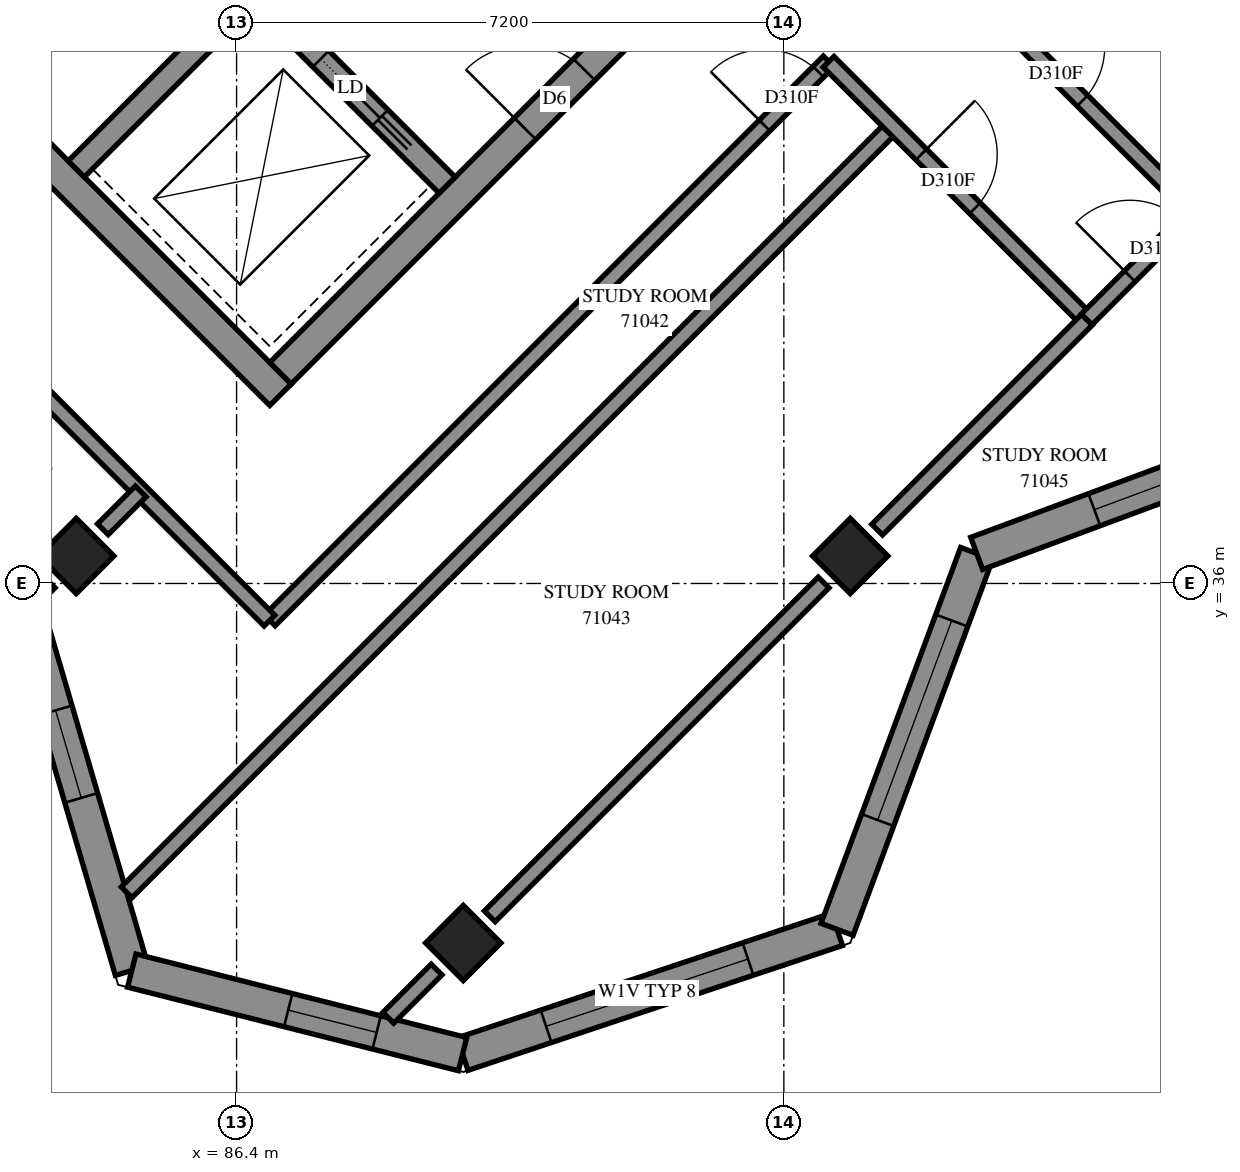
"""IFC4 building model, lengths in metres.
Left out: names, types, materials, properties, quantities, classifications, styles, units other than length and angle.
Written with IfcOpenShell. Run it as: python <this file> out.ifc"""

import sys

from ifc_helpers import new_model, si_unit, direction, frame, frame_2d, origin, origin_2d, place, context, subcontext, project, spatial, polyline, rectangle, outline, extrude, element, fill, save


model = new_model("IFC4")
c1 = context("Model", 3, precision=1e-05, world=origin(), true_north=direction((0.0, 1.0)))
c2 = subcontext(c1, "Body", "Model", "MODEL_VIEW")
j1 = project(units=[si_unit("LENGTHUNIT", "METRE"), si_unit("PLANEANGLEUNIT", "RADIAN")], contexts=[c1])
p1 = place(None, origin())
s1 = spatial("IfcSite", under=j1, at=p1, CompositionType="ELEMENT")
p2 = place(p1, origin())
s2 = spatial("IfcBuilding", under=s1, at=p2, CompositionType="ELEMENT")
p3 = place(p2, frame((0.0, 0.0, 260.8)))
s3 = spatial("IfcBuildingStorey", under=s2, at=p3, CompositionType="ELEMENT", Elevation=260.8)
for number, where, z_axis, x_axis in (
    (1, (84.291, 36.362, 0.0), (0.0, 0.0, 1.0), (0.707, -0.707, 0.0)),
    (2, (94.474, 36.362, 0.0), (0.0, 0.0, 1.0), (0.707, -0.707, 0.0)),
    (3, (89.382, 31.271, 0.0), (0.0, 0.0, 1.0), (0.707, -0.707, 0.0)),
):
    element("IfcColumn", number, at=place(p3, frame(where, z_axis=z_axis, x_axis=x_axis)), inside=s3, PredefinedType="COLUMN", context=c2, shape_type="SweptSolid", body=[
        extrude(rectangle(XDim=0.7, YDim=0.7, at=origin_2d()), origin(), (0.0, 0.0, 1.0), 3.1),
    ])
p4 = place(p3, frame((76.23, 49.231, -0.3), z_axis=(0.0, 0.0, 1.0), x_axis=(0.7071034917, -0.7071100706, 0.0)))
e4 = element("IfcWall", 4, at=p4, inside=s3, PredefinedType="SHEAR", context=c2, shape_type="SweptSolid", body=[
    extrude(rectangle(XDim=15.2, YDim=0.4, at=frame_2d((7.6, 0.0))), origin(), (0.0, 0.0, 1.0), 2.7),
])
p5 = place(p3, frame((86.978, 38.766, -0.3), z_axis=(0.0, 0.0, 1.0), x_axis=(0.7071067812, 0.7071067812, 0.0)))
e5 = element("IfcWall", 5, at=p5, inside=s3, PredefinedType="SHEAR", context=c2, shape_type="SweptSolid", body=[
    extrude(rectangle(XDim=14.4, YDim=0.4, at=frame_2d((7.2, 0.0))), origin(), (0.0, 0.0, 1.0), 2.7),
])
p6 = place(p5, frame((4.55, 0.0, 0.3)))
e6 = element("IfcOpeningElement", 6, at=p6, cuts=e5, PredefinedType="OPENING", context=c2, shape_type="SweptSolid", body=[
    extrude(rectangle(XDim=1.1, YDim=2.1, at=frame_2d((0.55, 1.05))), frame((0.0, 0.21, 0.0), z_axis=(0.0, -1.0, 0.0), x_axis=(1.0, 0.0, 0.0)), (0.0, 0.0, 1.0), 0.42),
])
p7 = place(p5, frame((11.35, 0.0, 0.3)))
e7 = element("IfcOpeningElement", 7, at=p7, cuts=e5, PredefinedType="OPENING", context=c2, shape_type="SweptSolid", body=[
    extrude(rectangle(XDim=1.1, YDim=2.1, at=frame_2d((0.55, 1.05))), frame((0.0, 0.21, 0.0), z_axis=(0.0, -1.0, 0.0), x_axis=(1.0, 0.0, 0.0)), (0.0, 0.0, 1.0), 0.42),
])
p8 = place(p3, frame((84.291, 41.453, 0.0), z_axis=(0.0, 0.0, 1.0), x_axis=(0.7071067812, 0.7071067812, 0.0)))
e8 = element("IfcWall", 8, at=p8, inside=s3, PredefinedType="SOLIDWALL", context=c2, shape_type="SweptSolid", body=[
    extrude(rectangle(XDim=3.3, YDim=0.3, at=frame_2d((1.65, 0.0))), origin(), (0.0, 0.0, 1.0), 3.1),
])
p9 = place(p3, frame((78.988, 51.423, 0.0), z_axis=(0.0, 0.0, 1.0), x_axis=(0.7071067812, -0.7071067812, 0.0)))
e9 = element("IfcWall", 9, at=p9, inside=s3, PredefinedType="SOLIDWALL", context=c2, shape_type="SweptSolid", body=[
    extrude(rectangle(XDim=14.4, YDim=0.3, at=frame_2d((7.2, 0.0))), origin(), (0.0, 0.0, 1.0), 3.1),
])
p10 = place(p9, frame((1.35, 0.0, 0.0)))
e10 = element("IfcOpeningElement", 10, at=p10, cuts=e9, PredefinedType="OPENING", context=c2, shape_type="SweptSolid", body=[
    extrude(rectangle(XDim=0.9, YDim=2.1, at=frame_2d((0.45, 1.05))), frame((0.0, 0.16, 0.0), z_axis=(0.0, -1.0, 0.0), x_axis=(1.0, 0.0, 0.0)), (0.0, 0.0, 1.0), 0.32),
])
p11 = place(p9, frame((4.95, 0.0, 0.0)))
e11 = element("IfcOpeningElement", 11, at=p11, cuts=e9, PredefinedType="OPENING", context=c2, shape_type="SweptSolid", body=[
    extrude(rectangle(XDim=0.9, YDim=2.1, at=frame_2d((0.45, 1.05))), frame((0.0, 0.16, 0.0), z_axis=(0.0, -1.0, 0.0), x_axis=(1.0, 0.0, 0.0)), (0.0, 0.0, 1.0), 0.32),
])
p12 = place(p9, frame((8.55, 0.0, 0.0)))
e12 = element("IfcOpeningElement", 12, at=p12, cuts=e9, PredefinedType="OPENING", context=c2, shape_type="SweptSolid", body=[
    extrude(rectangle(XDim=0.9, YDim=2.1, at=frame_2d((0.45, 1.05))), frame((0.0, 0.16, 0.0), z_axis=(0.0, -1.0, 0.0), x_axis=(1.0, 0.0, 0.0)), (0.0, 0.0, 1.0), 0.32),
])
p13 = place(p9, frame((12.05, 0.0, 0.0)))
e13 = element("IfcOpeningElement", 13, at=p13, cuts=e9, PredefinedType="OPENING", context=c2, shape_type="SweptSolid", body=[
    extrude(rectangle(XDim=1.1, YDim=2.1, at=frame_2d((0.55, 1.05))), frame((0.0, 0.16, 0.0), z_axis=(0.0, -1.0, 0.0), x_axis=(1.0, 0.0, 0.0)), (0.0, 0.0, 1.0), 0.32),
])
p14 = place(p3, frame((89.374, 29.808, 0.0), z_axis=(0.0, 0.0, 1.0), x_axis=(0.9486871493, 0.3162162119, 0.0)))
e14 = element("IfcWall", 14, at=p14, inside=s3, PredefinedType="SOLIDWALL", context=c2, shape_type="SweptSolid", body=[
    extrude(outline(polyline([(-0.066, -0.225), (5.301, -0.225), (5.085, 0.225), (0.066, 0.225), (-0.066, -0.225)])), origin(), (0.0, 0.0, 1.0), 3.1),
])
p15 = place(p14, frame((1.158, 0.0, 0.45)))
e15 = element("IfcOpeningElement", 15, at=p15, cuts=e14, PredefinedType="OPENING", context=c2, shape_type="SweptSolid", body=[
    extrude(rectangle(XDim=2.8, YDim=2.55, at=frame_2d((1.4, 1.275))), frame((0.0, 0.235, 0.0), z_axis=(0.0, -1.0, 0.0), x_axis=(1.0, 0.0, 0.0)), (0.0, 0.0, 1.0), 0.47),
])
p16 = place(p3, frame((94.3, 31.45, 0.0), z_axis=(0.0, 0.0, 1.0), x_axis=(0.3481927166, 0.9374229739, 0.0)))
e16 = element("IfcWall", 16, at=p16, inside=s3, PredefinedType="SOLIDWALL", context=c2, shape_type="SweptSolid", body=[
    extrude(outline(polyline([(-0.108, -0.225), (5.172, -0.225), (5.379, 0.225), (0.108, 0.225), (-0.108, -0.225)])), origin(), (0.0, 0.0, 1.0), 3.1),
])
p17 = place(p16, frame((1.534, 0.0, 0.45)))
e17 = element("IfcOpeningElement", 17, at=p17, cuts=e16, PredefinedType="OPENING", context=c2, shape_type="SweptSolid", body=[
    extrude(rectangle(XDim=2.8, YDim=2.55, at=frame_2d((1.4, 1.275))), frame((0.0, 0.235, 0.0), z_axis=(0.0, -1.0, 0.0), x_axis=(1.0, 0.0, 0.0)), (0.0, 0.0, 1.0), 0.47),
])
p18 = place(p3, frame((96.137, 36.395, 0.0), z_axis=(0.0, 0.0, 1.0), x_axis=(0.937429161, 0.3481760591, 0.0)))
e18 = element("IfcWall", 18, at=p18, inside=s3, PredefinedType="SOLIDWALL", context=c2, shape_type="SweptSolid", body=[
    extrude(outline(polyline([(0.103, -0.225), (5.383, -0.225), (5.168, 0.225), (-0.103, 0.225), (0.103, -0.225)])), origin(), (0.0, 0.0, 1.0), 3.1),
])
p19 = place(p18, frame((1.651, 0.0, 0.45)))
e19 = element("IfcOpeningElement", 19, at=p19, cuts=e18, PredefinedType="OPENING", context=c2, shape_type="SweptSolid", body=[
    extrude(rectangle(XDim=2.8, YDim=2.55, at=frame_2d((1.4, 1.275))), frame((0.0, 0.235, 0.0), z_axis=(0.0, -1.0, 0.0), x_axis=(1.0, 0.0, 0.0)), (0.0, 0.0, 1.0), 0.47),
])
p20 = place(p3, frame((83.734, 35.301, 0.0), z_axis=(0.0, 0.0, 1.0), x_axis=(0.281023871, -0.9597007783, 0.0)))
e20 = element("IfcWall", 20, at=p20, inside=s3, PredefinedType="SOLIDWALL", context=c2, shape_type="SweptSolid", body=[
    extrude(outline(polyline([(0.123, -0.225), (4.707, -0.225), (4.45, 0.225), (-0.123, 0.225), (0.123, -0.225)])), origin(), (0.0, 0.0, 1.0), 3.1),
])
p21 = place(p20, frame((1.012, 0.0, 0.45)))
e21 = element("IfcOpeningElement", 21, at=p21, cuts=e20, PredefinedType="OPENING", context=c2, shape_type="SweptSolid", body=[
    extrude(rectangle(XDim=1.2, YDim=2.55, at=frame_2d((0.6, 1.275))), frame((0.0, 0.235, 0.0), z_axis=(0.0, -1.0, 0.0), x_axis=(1.0, 0.0, 0.0)), (0.0, 0.0, 1.0), 0.47),
])
p22 = place(p3, frame((85.021, 30.907, 0.0), z_axis=(0.0, 0.0, 1.0), x_axis=(0.9695579017, -0.2448621555, 0.0)))
e22 = element("IfcWall", 22, at=p22, inside=s3, PredefinedType="SOLIDWALL", context=c2, shape_type="SweptSolid", body=[
    extrude(outline(polyline([(-0.129, -0.225), (4.555, -0.225), (4.423, 0.225), (0.129, 0.225), (-0.129, -0.225)])), origin(), (0.0, 0.0, 1.0), 3.1),
])
p23 = place(p22, frame((2.123, 0.0, 0.45)))
e23 = element("IfcOpeningElement", 23, at=p23, cuts=e22, PredefinedType="OPENING", context=c2, shape_type="SweptSolid", body=[
    extrude(rectangle(XDim=1.2, YDim=2.55, at=frame_2d((0.6, 1.275))), frame((0.0, 0.235, 0.0), z_axis=(0.0, -1.0, 0.0), x_axis=(1.0, 0.0, 0.0)), (0.0, 0.0, 1.0), 0.47),
])
p24 = place(p3, frame((84.954, 31.938, 0.0), z_axis=(0.0, 0.0, 1.0), x_axis=(0.7071769042, 0.7070366512, 0.0)))
e24 = element("IfcWall", 24, at=p24, inside=s3, PredefinedType="PARTITIONING", context=c2, shape_type="SweptSolid", body=[
    extrude(rectangle(XDim=14.26, YDim=0.2, at=frame_2d((7.13, 0.0))), origin(), (0.0, 0.0, 1.0), 3.1),
])
p25 = place(p3, frame((86.836, 35.514, 0.0), z_axis=(0.0, 0.0, 1.0), x_axis=(0.7071067812, 0.7071067812, 0.0)))
e25 = element("IfcWall", 25, at=p25, inside=s3, PredefinedType="PARTITIONING", context=c2, shape_type="SweptSolid", body=[
    extrude(rectangle(XDim=10.4, YDim=0.2, at=frame_2d((5.2, 0.0))), origin(), (0.0, 0.0, 1.0), 3.1),
])
p26 = place(p25, frame((9.207, 0.0, 0.0)))
e26 = element("IfcOpeningElement", 26, at=p26, cuts=e25, PredefinedType="OPENING", context=c2, shape_type="SweptSolid", body=[
    extrude(rectangle(XDim=1.0, YDim=2.1, at=frame_2d((0.5, 1.05))), frame((0.0, 0.11, 0.0), z_axis=(0.0, -1.0, 0.0), x_axis=(1.0, 0.0, 0.0)), (0.0, 0.0, 1.0), 0.22),
])
p27 = place(p3, frame((80.747, 41.597, 0.0), z_axis=(0.0, 0.0, 1.0), x_axis=(0.7071067812, -0.7071067812, 0.0)))
e27 = element("IfcWall", 27, at=p27, inside=s3, PredefinedType="PARTITIONING", context=c2, shape_type="SweptSolid", body=[
    extrude(rectangle(XDim=8.607, YDim=0.2, at=frame_2d((4.303, 0.0))), origin(), (0.0, 0.0, 1.0), 3.1),
])
p28 = place(p27, frame((0.195, 0.0, 0.0)))
e28 = element("IfcOpeningElement", 28, at=p28, cuts=e27, PredefinedType="OPENING", context=c2, shape_type="SweptSolid", body=[
    extrude(rectangle(XDim=1.0, YDim=2.1, at=frame_2d((0.5, 1.05))), frame((0.0, 0.11, 0.0), z_axis=(0.0, -1.0, 0.0), x_axis=(1.0, 0.0, 0.0)), (0.0, 0.0, 1.0), 0.22),
])
p29 = place(p27, frame((3.133, 0.0, 0.0)))
e29 = element("IfcOpeningElement", 29, at=p29, cuts=e27, PredefinedType="OPENING", context=c2, shape_type="SweptSolid", body=[
    extrude(rectangle(XDim=1.0, YDim=2.1, at=frame_2d((0.5, 1.05))), frame((0.0, 0.11, 0.0), z_axis=(0.0, -1.0, 0.0), x_axis=(1.0, 0.0, 0.0)), (0.0, 0.0, 1.0), 0.22),
])
p30 = place(p3, frame((89.731, 31.621, 0.0), z_axis=(0.0, 0.0, 1.0), x_axis=(0.7071067812, 0.7071067812, 0.0)))
e30 = element("IfcWall", 30, at=p30, inside=s3, PredefinedType="PARTITIONING", context=c2, shape_type="SweptSolid", body=[
    extrude(rectangle(XDim=6.211, YDim=0.2, at=frame_2d((3.106, 0.0))), origin(), (0.0, 0.0, 1.0), 2.6),
])
p31 = place(p3, frame((95.603, 44.277, 0.0), z_axis=(0.0, 0.0, 1.0), x_axis=(0.7071067812, -0.7071067812, 0.0)))
e31 = element("IfcWall", 31, at=p31, inside=s3, PredefinedType="PARTITIONING", context=c2, shape_type="SweptSolid", body=[
    extrude(rectangle(XDim=4.797, YDim=0.2, at=frame_2d((2.398, 0.0))), origin(), (0.0, 0.0, 1.0), 3.1),
])
p32 = place(p31, frame((1.723, 0.0, 0.0)))
e32 = element("IfcOpeningElement", 32, at=p32, cuts=e31, PredefinedType="OPENING", context=c2, shape_type="SweptSolid", body=[
    extrude(rectangle(XDim=1.0, YDim=2.1, at=frame_2d((0.5, 1.05))), frame((0.0, 0.11, 0.0), z_axis=(0.0, -1.0, 0.0), x_axis=(1.0, 0.0, 0.0)), (0.0, 0.0, 1.0), 0.22),
])
p33 = place(p3, frame((94.189, 42.863, 0.0), z_axis=(0.0, 0.0, 1.0), x_axis=(0.7071067812, -0.7071067812, 0.0)))
e33 = element("IfcWall", 33, at=p33, inside=s3, PredefinedType="PARTITIONING", context=c2, shape_type="SweptSolid", body=[
    extrude(rectangle(XDim=4.797, YDim=0.2, at=frame_2d((2.398, 0.0))), origin(), (0.0, 0.0, 1.0), 3.1),
])
p34 = place(p33, frame((1.723, 0.0, 0.0)))
e34 = element("IfcOpeningElement", 34, at=p34, cuts=e33, PredefinedType="OPENING", context=c2, shape_type="SweptSolid", body=[
    extrude(rectangle(XDim=1.0, YDim=2.1, at=frame_2d((0.5, 1.05))), frame((0.0, 0.11, 0.0), z_axis=(0.0, -1.0, 0.0), x_axis=(1.0, 0.0, 0.0)), (0.0, 0.0, 1.0), 0.22),
])
p35 = place(p3, frame((94.828, 36.709, 0.0), z_axis=(0.0, 0.0, 1.0), x_axis=(0.7068506295, 0.7073628401, 0.0)))
e35 = element("IfcWall", 35, at=p35, inside=s3, PredefinedType="PARTITIONING", context=c2, shape_type="SweptSolid", body=[
    extrude(rectangle(XDim=3.905, YDim=0.2, at=frame_2d((1.952, 0.0))), origin(), (0.0, 0.0, 1.0), 2.6),
])
p36 = place(p3, frame((97.584, 39.474, 0.0), z_axis=(0.0, 0.0, 1.0), x_axis=(0.7071067812, 0.7071067812, 0.0)))
e36 = element("IfcWall", 36, at=p36, inside=s3, PredefinedType="PARTITIONING", context=c2, shape_type="SweptSolid", body=[
    extrude(rectangle(XDim=2.0, YDim=0.2, at=frame_2d((1.0, 0.0))), origin(), (0.0, 0.0, 1.0), 2.6),
])
p37 = place(p36, frame((0.803, 0.0, 0.0)))
e37 = element("IfcOpeningElement", 37, at=p37, cuts=e36, PredefinedType="OPENING", context=c2, shape_type="SweptSolid", body=[
    extrude(rectangle(XDim=1.0, YDim=2.1, at=frame_2d((0.5, 1.05))), frame((0.0, 0.11, 0.0), z_axis=(0.0, -1.0, 0.0), x_axis=(1.0, 0.0, 0.0)), (0.0, 0.0, 1.0), 0.22),
])
p38 = place(p3, frame((88.397, 30.287, 0.0), z_axis=(0.0, 0.0, 1.0), x_axis=(0.7070510442, 0.7071625137, 0.0)))
e38 = element("IfcWall", 38, at=p38, inside=s3, PredefinedType="PARTITIONING", context=c2, shape_type="SweptSolid", body=[
    extrude(rectangle(XDim=0.897, YDim=0.2, at=frame_2d((0.449, 0.0))), origin(), (0.0, 0.0, 1.0), 3.1),
])
p39 = place(p3, frame((84.641, 36.713, 0.0), z_axis=(0.0, 0.0, 1.0), x_axis=(0.7071067812, 0.7071067812, 0.0)))
e39 = element("IfcWall", 39, at=p39, inside=s3, PredefinedType="PARTITIONING", context=c2, shape_type="SweptSolid", body=[
    extrude(rectangle(XDim=0.704, YDim=0.2, at=frame_2d((0.352, 0.0))), origin(), (0.0, 0.0, 1.0), 3.1),
])
p40 = place(p3, frame((83.525, 35.597, 0.0), z_axis=(0.0, 0.0, 1.0), x_axis=(0.7070217975, 0.7071917547, 0.0)))
e40 = element("IfcWall", 40, at=p40, inside=s3, PredefinedType="PARTITIONING", context=c2, shape_type="SweptSolid", body=[
    extrude(rectangle(XDim=0.588, YDim=0.2, at=frame_2d((0.294, 0.0))), origin(), (0.0, 0.0, 1.0), 3.1),
])
p41 = place(p15, origin())
e41 = element("IfcWindow", 41, at=p41, inside=s3, PartitioningType="SINGLE_PANEL", PredefinedType="WINDOW", context=c2, shape_type="SweptSolid", body=[
    extrude(rectangle(XDim=2.8, YDim=2.55, at=frame_2d((1.4, 1.275))), frame((0.0, 0.205, 0.0), z_axis=(0.0, -1.0, 0.0), x_axis=(1.0, 0.0, 0.0)), (0.0, 0.0, 1.0), 0.06),
])
fill(e15, e41)
p42 = place(p17, origin())
e42 = element("IfcWindow", 42, at=p42, inside=s3, PartitioningType="SINGLE_PANEL", PredefinedType="WINDOW", context=c2, shape_type="SweptSolid", body=[
    extrude(rectangle(XDim=2.8, YDim=2.55, at=frame_2d((1.4, 1.275))), frame((0.0, 0.205, 0.0), z_axis=(0.0, -1.0, 0.0), x_axis=(1.0, 0.0, 0.0)), (0.0, 0.0, 1.0), 0.06),
])
fill(e17, e42)
p43 = place(p19, origin())
e43 = element("IfcWindow", 43, at=p43, inside=s3, PartitioningType="SINGLE_PANEL", PredefinedType="WINDOW", context=c2, shape_type="SweptSolid", body=[
    extrude(rectangle(XDim=2.8, YDim=2.55, at=frame_2d((1.4, 1.275))), frame((0.0, 0.205, 0.0), z_axis=(0.0, -1.0, 0.0), x_axis=(1.0, 0.0, 0.0)), (0.0, 0.0, 1.0), 0.06),
])
fill(e19, e43)
p44 = place(p21, origin())
e44 = element("IfcWindow", 44, at=p44, inside=s3, PartitioningType="SINGLE_PANEL", PredefinedType="WINDOW", context=c2, shape_type="SweptSolid", body=[
    extrude(rectangle(XDim=1.2, YDim=2.55, at=frame_2d((0.6, 1.275))), frame((0.0, 0.205, 0.0), z_axis=(0.0, -1.0, 0.0), x_axis=(1.0, 0.0, 0.0)), (0.0, 0.0, 1.0), 0.06),
])
fill(e21, e44)
p45 = place(p23, origin())
e45 = element("IfcWindow", 45, at=p45, inside=s3, PartitioningType="SINGLE_PANEL", PredefinedType="WINDOW", context=c2, shape_type="SweptSolid", body=[
    extrude(rectangle(XDim=1.2, YDim=2.55, at=frame_2d((0.6, 1.275))), frame((0.0, 0.205, 0.0), z_axis=(0.0, -1.0, 0.0), x_axis=(1.0, 0.0, 0.0)), (0.0, 0.0, 1.0), 0.06),
])
fill(e23, e45)
p46 = place(p6, origin())
e46 = element("IfcDoor", 46, at=p46, inside=s3, OperationType="DOUBLE_DOOR_SINGLE_SWING", PredefinedType="DOOR", context=c2, shape_type="SweptSolid", body=[
    extrude(rectangle(XDim=1.1, YDim=2.1, at=frame_2d((0.55, 1.05))), frame((0.0, 0.025, 0.0), z_axis=(0.0, -1.0, 0.0), x_axis=(1.0, 0.0, 0.0)), (0.0, 0.0, 1.0), 0.05),
])
fill(e6, e46)
p47 = place(p13, origin())
e47 = element("IfcDoor", 47, at=p47, inside=s3, OperationType="SLIDING_TO_RIGHT", PredefinedType="DOOR", context=c2, shape_type="SweptSolid", body=[
    extrude(rectangle(XDim=1.1, YDim=2.1, at=frame_2d((0.55, 1.05))), frame((0.0, 0.025, 0.0), z_axis=(0.0, -1.0, 0.0), x_axis=(1.0, 0.0, 0.0)), (0.0, 0.0, 1.0), 0.05),
])
fill(e13, e47)
p48 = place(p26, origin())
e48 = element("IfcDoor", 48, at=p48, inside=s3, OperationType="SINGLE_SWING_RIGHT", PredefinedType="DOOR", context=c2, shape_type="SweptSolid", body=[
    extrude(rectangle(XDim=1.0, YDim=2.1, at=frame_2d((0.5, 1.05))), frame((0.0, 0.025, 0.0), z_axis=(0.0, -1.0, 0.0), x_axis=(1.0, 0.0, 0.0)), (0.0, 0.0, 1.0), 0.05),
])
fill(e26, e48)
p49 = place(p34, origin())
e49 = element("IfcDoor", 49, at=p49, inside=s3, OperationType="SINGLE_SWING_LEFT", PredefinedType="DOOR", context=c2, shape_type="SweptSolid", body=[
    extrude(rectangle(XDim=1.0, YDim=2.1, at=frame_2d((0.5, 1.05))), frame((0.0, 0.025, 0.0), z_axis=(0.0, -1.0, 0.0), x_axis=(1.0, 0.0, 0.0)), (0.0, 0.0, 1.0), 0.05),
])
fill(e34, e49)
p50 = place(p32, origin())
e50 = element("IfcDoor", 50, at=p50, inside=s3, OperationType="SINGLE_SWING_RIGHT", PredefinedType="DOOR", context=c2, shape_type="SweptSolid", body=[
    extrude(rectangle(XDim=1.0, YDim=2.1, at=frame_2d((0.5, 1.05))), frame((0.0, 0.025, 0.0), z_axis=(0.0, -1.0, 0.0), x_axis=(1.0, 0.0, 0.0)), (0.0, 0.0, 1.0), 0.05),
])
fill(e32, e50)
p51 = place(p37, origin())
e51 = element("IfcDoor", 51, at=p51, inside=s3, OperationType="SINGLE_SWING_RIGHT", PredefinedType="DOOR", context=c2, shape_type="SweptSolid", body=[
    extrude(rectangle(XDim=1.0, YDim=2.1, at=frame_2d((0.5, 1.05))), frame((0.0, 0.025, 0.0), z_axis=(0.0, -1.0, 0.0), x_axis=(1.0, 0.0, 0.0)), (0.0, 0.0, 1.0), 0.05),
])
fill(e37, e51)
save(model, sys.argv[1])
